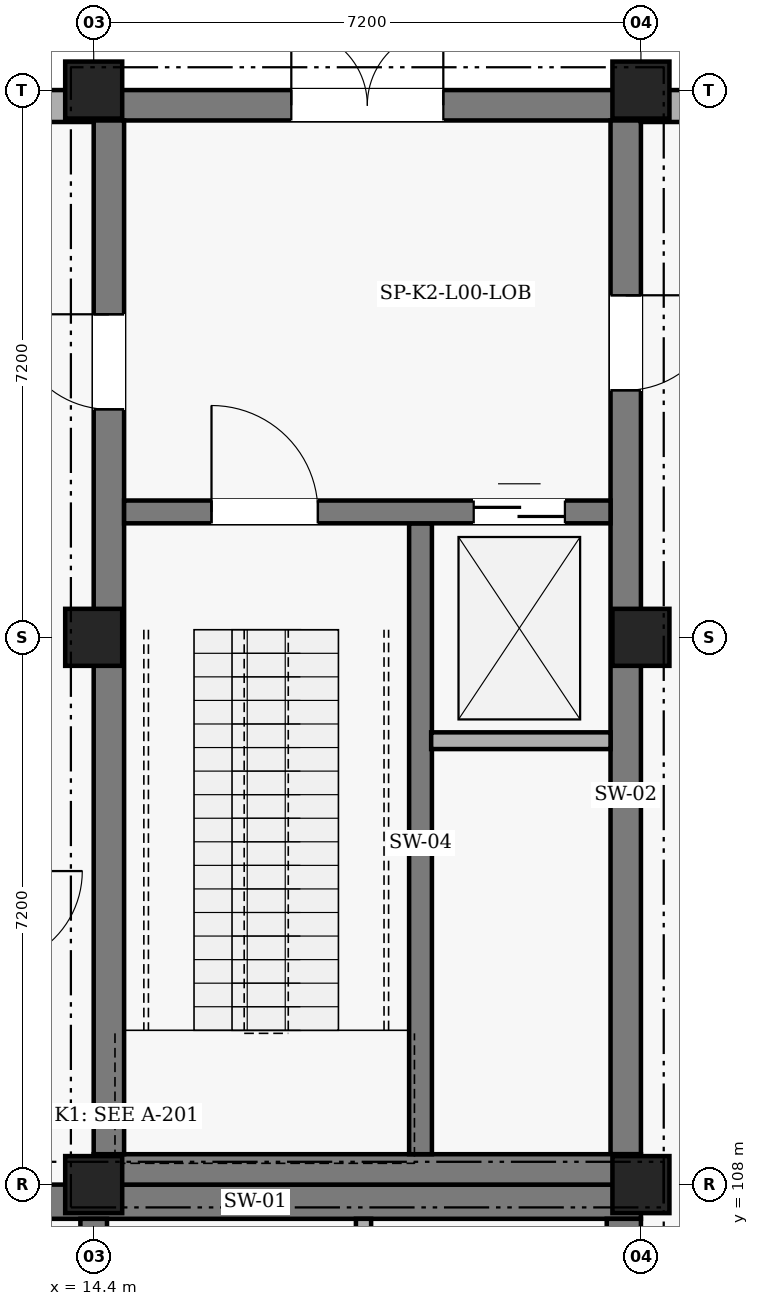
"""IFC4 building model, lengths in metres.
Left out: names, types, materials, properties, quantities, classifications, styles, units other than length and angle.
Written with IfcOpenShell. Run it as: python <this file> out.ifc"""

import sys

from ifc_helpers import new_model, si_unit, direction, frame, frame_2d, origin, origin_2d, place, context, subcontext, project, spatial, rectangle, extrude, element, fill, save


model = new_model("IFC4")
c1 = context("Model", 3, precision=1e-05, world=origin(), true_north=direction((0.0, 1.0)))
c2 = subcontext(c1, "Body", "Model", "MODEL_VIEW")
j1 = project(units=[si_unit("LENGTHUNIT", "METRE"), si_unit("PLANEANGLEUNIT", "RADIAN")], contexts=[c1])
p1 = place(None, origin())
s1 = spatial("IfcSite", under=j1, at=p1, CompositionType="ELEMENT")
p2 = place(p1, origin())
s2 = spatial("IfcBuilding", under=s1, at=p2, CompositionType="ELEMENT")
p3 = place(p2, origin())
s3 = spatial("IfcBuildingStorey", under=s2, at=p3, CompositionType="ELEMENT", Elevation=0.0)
p4 = place(p3, frame((7.2, 107.775, 0.0), z_axis=(0.0, 0.0, 1.0), x_axis=(1.0, 0.0, 0.0)))
e1 = element("IfcWall", 1, at=p4, inside=s3, PredefinedType="SHEAR", context=c2, shape_type="SweptSolid", body=[
    extrude(rectangle(XDim=14.4, YDim=0.45, at=frame_2d((7.2, 0.0))), origin(), (0.0, 0.0, 1.0), 5.4),
])
p5 = place(p4, frame((2.4, 0.0, 0.0)))
e2 = element("IfcOpeningElement", 2, at=p5, cuts=e1, PredefinedType="OPENING", context=c2, shape_type="SweptSolid", body=[
    extrude(rectangle(XDim=1.25, YDim=2.2, at=frame_2d((0.625, 1.1))), frame((0.0, 0.235, 0.0), z_axis=(0.0, -1.0, 0.0), x_axis=(1.0, 0.0, 0.0)), (0.0, 0.0, 1.0), 0.47),
])
p6 = place(p3, frame((21.375, 107.55, 0.0), z_axis=(0.0, 0.0, 1.0), x_axis=(0.0, -1.0, 0.0)))
e3 = element("IfcWall", 3, at=p6, inside=s3, PredefinedType="SHEAR", context=c2, shape_type="SweptSolid", body=[
    extrude(rectangle(XDim=13.5, YDim=0.45, at=frame_2d((6.75, 0.0))), origin(), (0.0, 0.0, 1.0), 5.4),
])
p7 = place(p6, frame((9.8, 0.0, 0.0)))
e4 = element("IfcOpeningElement", 4, at=p7, cuts=e3, PredefinedType="OPENING", context=c2, shape_type="SweptSolid", body=[
    extrude(rectangle(XDim=1.0, YDim=2.15, at=frame_2d((0.5, 1.075))), frame((0.0, 0.235, 0.0), z_axis=(0.0, -1.0, 0.0), x_axis=(1.0, 0.0, 0.0)), (0.0, 0.0, 1.0), 0.47),
])
p8 = place(p6, frame((2.3, 0.0, 0.0)))
e5 = element("IfcOpeningElement", 5, at=p8, cuts=e3, PredefinedType="OPENING", context=c2, shape_type="SweptSolid", body=[
    extrude(rectangle(XDim=1.25, YDim=2.2, at=frame_2d((0.625, 1.1))), frame((0.0, 0.235, 0.0), z_axis=(0.0, -1.0, 0.0), x_axis=(1.0, 0.0, 0.0)), (0.0, 0.0, 1.0), 0.47),
])
p9 = place(p3, frame((14.4, 107.55, 0.0), z_axis=(0.0, 0.0, 1.0), x_axis=(0.0, -1.0, 0.0)))
e6 = element("IfcWall", 6, at=p9, inside=s3, PredefinedType="SHEAR", context=c2, shape_type="SweptSolid", body=[
    extrude(rectangle(XDim=13.5, YDim=0.35, at=frame_2d((6.75, 0.0))), origin(), (0.0, 0.0, 1.0), 5.4),
])
p10 = place(p9, frame((1.4, 0.0, 0.0)))
e7 = element("IfcOpeningElement", 7, at=p10, cuts=e6, PredefinedType="OPENING", context=c2, shape_type="SweptSolid", body=[
    extrude(rectangle(XDim=1.25, YDim=2.2, at=frame_2d((0.625, 1.1))), frame((0.0, 0.185, 0.0), z_axis=(0.0, -1.0, 0.0), x_axis=(1.0, 0.0, 0.0)), (0.0, 0.0, 1.0), 0.37),
])
p11 = place(p3, frame((14.4, 122.2, 0.0), z_axis=(0.0, 0.0, 1.0), x_axis=(1.0, 0.0, 0.0)))
e8 = element("IfcWall", 8, at=p11, inside=s3, PredefinedType="SHEAR", context=c2, shape_type="SweptSolid", body=[
    extrude(rectangle(XDim=7.2, YDim=0.4, at=frame_2d((3.6, 0.0))), origin(), (0.0, 0.0, 1.0), 5.4),
])
p12 = place(p11, frame((2.6, 0.0, 0.0)))
e9 = element("IfcOpeningElement", 9, at=p12, cuts=e8, PredefinedType="OPENING", context=c2, shape_type="SweptSolid", body=[
    extrude(rectangle(XDim=2.0, YDim=2.3, at=frame_2d((1.0, 1.15))), frame((0.0, 0.21, 0.0), z_axis=(0.0, -1.0, 0.0), x_axis=(1.0, 0.0, 0.0)), (0.0, 0.0, 1.0), 0.42),
])
p13 = place(p3, frame((21.4, 122.0, 0.0), z_axis=(0.0, 0.0, 1.0), x_axis=(0.0, -1.0, 0.0)))
e10 = element("IfcWall", 10, at=p13, inside=s3, PredefinedType="SHEAR", context=c2, shape_type="SweptSolid", body=[
    extrude(rectangle(XDim=13.6, YDim=0.4, at=frame_2d((6.8, 0.0))), origin(), (0.0, 0.0, 1.0), 5.4),
])
p14 = place(p13, frame((2.3, 0.0, 0.0)))
e11 = element("IfcOpeningElement", 11, at=p14, cuts=e10, PredefinedType="OPENING", context=c2, shape_type="SweptSolid", body=[
    extrude(rectangle(XDim=1.25, YDim=2.2, at=frame_2d((0.625, 1.1))), frame((0.0, 0.21, 0.0), z_axis=(0.0, -1.0, 0.0), x_axis=(1.0, 0.0, 0.0)), (0.0, 0.0, 1.0), 0.42),
])
p15 = place(p3, frame((21.6, 108.2, 0.0), z_axis=(0.0, 0.0, 1.0), x_axis=(-1.0, 0.0, 0.0)))
e12 = element("IfcWall", 12, at=p15, inside=s3, PredefinedType="SHEAR", context=c2, shape_type="SweptSolid", body=[
    extrude(rectangle(XDim=7.2, YDim=0.4, at=frame_2d((3.6, 0.0))), origin(), (0.0, 0.0, 1.0), 5.4),
])
p16 = place(p3, frame((14.6, 108.4, 0.0), z_axis=(0.0, 0.0, 1.0), x_axis=(0.0, 1.0, 0.0)))
e13 = element("IfcWall", 13, at=p16, inside=s3, PredefinedType="SHEAR", context=c2, shape_type="SweptSolid", body=[
    extrude(rectangle(XDim=13.6, YDim=0.4, at=frame_2d((6.8, 0.0))), origin(), (0.0, 0.0, 1.0), 5.4),
])
p17 = place(p16, frame((9.8, 0.0, 0.0)))
e14 = element("IfcOpeningElement", 14, at=p17, cuts=e13, PredefinedType="OPENING", context=c2, shape_type="SweptSolid", body=[
    extrude(rectangle(XDim=1.25, YDim=2.2, at=frame_2d((0.625, 1.1))), frame((0.0, 0.21, 0.0), z_axis=(0.0, -1.0, 0.0), x_axis=(1.0, 0.0, 0.0)), (0.0, 0.0, 1.0), 0.42),
])
p18 = place(p3, frame((18.7, 116.7, 0.0), z_axis=(0.0, 0.0, 1.0), x_axis=(0.0, -1.0, 0.0)))
e15 = element("IfcWall", 15, at=p18, inside=s3, PredefinedType="SHEAR", context=c2, shape_type="SweptSolid", body=[
    extrude(rectangle(XDim=8.3, YDim=0.3, at=frame_2d((4.15, 0.0))), origin(), (0.0, 0.0, 1.0), 5.4),
])
p19 = place(p3, frame((14.8, 116.85, 0.0), z_axis=(0.0, 0.0, 1.0), x_axis=(1.0, 0.0, 0.0)))
e16 = element("IfcWall", 16, at=p19, inside=s3, PredefinedType="SHEAR", context=c2, shape_type="SweptSolid", body=[
    extrude(rectangle(XDim=6.4, YDim=0.3, at=frame_2d((3.2, 0.0))), origin(), (0.0, 0.0, 1.0), 5.4),
])
p20 = place(p19, frame((1.15, 0.0, 0.0)))
e17 = element("IfcOpeningElement", 17, at=p20, cuts=e16, PredefinedType="OPENING", context=c2, shape_type="SweptSolid", body=[
    extrude(rectangle(XDim=1.4, YDim=2.2, at=frame_2d((0.7, 1.1))), frame((0.0, 0.16, 0.0), z_axis=(0.0, -1.0, 0.0), x_axis=(1.0, 0.0, 0.0)), (0.0, 0.0, 1.0), 0.32),
])
p21 = place(p19, frame((4.6, 0.0, 0.0)))
e18 = element("IfcOpeningElement", 18, at=p21, cuts=e16, PredefinedType="OPENING", context=c2, shape_type="SweptSolid", body=[
    extrude(rectangle(XDim=1.2, YDim=2.15, at=frame_2d((0.6, 1.075))), frame((0.0, 0.16, 0.0), z_axis=(0.0, -1.0, 0.0), x_axis=(1.0, 0.0, 0.0)), (0.0, 0.0, 1.0), 0.32),
])
for number, where, z_axis, x_axis in (
    (19, (14.4, 108.0, 0.0), (0.0, 0.0, 1.0), (1.0, 0.0, 0.0)),
    (20, (14.4, 115.2, 0.0), (0.0, 0.0, 1.0), (1.0, 0.0, 0.0)),
    (21, (14.4, 122.4, 0.0), (0.0, 0.0, 1.0), (1.0, 0.0, 0.0)),
    (22, (21.6, 108.0, 0.0), (0.0, 0.0, 1.0), (1.0, 0.0, 0.0)),
    (23, (21.6, 115.2, 0.0), (0.0, 0.0, 1.0), (1.0, 0.0, 0.0)),
    (24, (21.6, 122.4, 0.0), (0.0, 0.0, 1.0), (1.0, 0.0, 0.0)),
):
    element("IfcColumn", number, at=place(p3, frame(where, z_axis=z_axis, x_axis=x_axis)), inside=s3, PredefinedType="COLUMN", context=c2, shape_type="SweptSolid", body=[
        extrude(rectangle(XDim=0.75, YDim=0.75, at=origin_2d()), origin(), (0.0, 0.0, 1.0), 5.08),
    ])
p22 = place(p3, frame((7.2, 122.19, 0.0), z_axis=(0.0, 0.0, 1.0), x_axis=(1.0, 0.0, 0.0)))
e25 = element("IfcWall", 25, at=p22, inside=s3, PredefinedType="SOLIDWALL", context=c2, shape_type="SweptSolid", body=[
    extrude(rectangle(XDim=7.2, YDim=0.42, at=frame_2d((3.6, 0.0))), origin(), (0.0, 0.0, 1.0), 4.78),
])
p23 = place(p22, frame((2.5, 0.0, 0.0)))
e26 = element("IfcOpeningElement", 26, at=p23, cuts=e25, PredefinedType="OPENING", context=c2, shape_type="SweptSolid", body=[
    extrude(rectangle(XDim=2.2, YDim=2.4, at=frame_2d((1.1, 1.2))), frame((0.0, 0.22, 0.0), z_axis=(0.0, -1.0, 0.0), x_axis=(1.0, 0.0, 0.0)), (0.0, 0.0, 1.0), 0.44),
])
p24 = place(p3, frame((21.6, 122.19, 0.0), z_axis=(0.0, 0.0, 1.0), x_axis=(1.0, 0.0, 0.0)))
e27 = element("IfcWall", 27, at=p24, inside=s3, PredefinedType="SOLIDWALL", context=c2, shape_type="SweptSolid", body=[
    extrude(rectangle(XDim=7.2, YDim=0.42, at=frame_2d((3.6, 0.0))), origin(), (0.0, 0.0, 1.0), 4.78),
])
p25 = place(p24, frame((2.4, 0.0, 0.0)))
e28 = element("IfcOpeningElement", 28, at=p25, cuts=e27, PredefinedType="OPENING", context=c2, shape_type="SweptSolid", body=[
    extrude(rectangle(XDim=2.4, YDim=2.5, at=frame_2d((1.2, 1.25))), frame((0.0, 0.22, 0.0), z_axis=(0.0, -1.0, 0.0), x_axis=(1.0, 0.0, 0.0)), (0.0, 0.0, 1.0), 0.44),
])
p26 = place(p3, frame((17.95, 102.56, 0.0), z_axis=(0.0, 0.0, 1.0), x_axis=(0.0, 1.0, 0.0)))
e29 = element("IfcWall", 29, at=p26, inside=s3, PredefinedType="PARTITIONING", context=c2, shape_type="SweptSolid", body=[
    extrude(rectangle(XDim=4.99, YDim=0.2, at=frame_2d((2.495, 0.0))), origin(), (0.0, 0.0, 1.0), 5.05),
])
p27 = place(p26, frame((1.6, 0.0, 0.0)))
e30 = element("IfcOpeningElement", 30, at=p27, cuts=e29, PredefinedType="OPENING", context=c2, shape_type="SweptSolid", body=[
    extrude(rectangle(XDim=1.25, YDim=2.2, at=frame_2d((0.625, 1.1))), frame((0.0, 0.11, 0.0), z_axis=(0.0, -1.0, 0.0), x_axis=(1.0, 0.0, 0.0)), (0.0, 0.0, 1.0), 0.22),
])
p28 = place(p3, frame((18.84, 113.84, 0.0), z_axis=(0.0, 0.0, 1.0), x_axis=(1.0, 0.0, 0.0)))
e31 = element("IfcWall", 31, at=p28, inside=s3, PredefinedType="PARTITIONING", context=c2, shape_type="SweptSolid", body=[
    extrude(rectangle(XDim=2.36, YDim=0.22, at=frame_2d((1.18, 0.0))), origin(), (0.0, 0.0, 1.0), 5.05),
])
p29 = place(p12, origin())
e32 = element("IfcDoor", 32, at=p29, inside=s3, OperationType="DOUBLE_DOOR_SINGLE_SWING", PredefinedType="DOOR", context=c2, shape_type="SweptSolid", body=[
    extrude(rectangle(XDim=2.0, YDim=2.3, at=frame_2d((1.0, 1.15))), frame((0.0, 0.025, 0.0), z_axis=(0.0, -1.0, 0.0), x_axis=(1.0, 0.0, 0.0)), (0.0, 0.0, 1.0), 0.05),
])
fill(e9, e32)
p30 = place(p20, origin())
e33 = element("IfcDoor", 33, at=p30, inside=s3, OperationType="SINGLE_SWING_LEFT", PredefinedType="DOOR", context=c2, shape_type="SweptSolid", body=[
    extrude(rectangle(XDim=1.4, YDim=2.2, at=frame_2d((0.7, 1.1))), frame((0.0, 0.025, 0.0), z_axis=(0.0, -1.0, 0.0), x_axis=(1.0, 0.0, 0.0)), (0.0, 0.0, 1.0), 0.05),
])
fill(e17, e33)
p31 = place(p21, origin())
e34 = element("IfcDoor", 34, at=p31, inside=s3, OperationType="DOUBLE_DOOR_SLIDING", PredefinedType="DOOR", context=c2, shape_type="SweptSolid", body=[
    extrude(rectangle(XDim=1.2, YDim=2.15, at=frame_2d((0.6, 1.075))), frame((0.0, 0.025, 0.0), z_axis=(0.0, -1.0, 0.0), x_axis=(1.0, 0.0, 0.0)), (0.0, 0.0, 1.0), 0.05),
])
fill(e18, e34)
p32 = place(p17, origin())
e35 = element("IfcDoor", 35, at=p32, inside=s3, OperationType="SINGLE_SWING_RIGHT", PredefinedType="DOOR", context=c2, shape_type="SweptSolid", body=[
    extrude(rectangle(XDim=1.25, YDim=2.2, at=frame_2d((0.625, 1.1))), frame((0.0, 0.025, 0.0), z_axis=(0.0, -1.0, 0.0), x_axis=(1.0, 0.0, 0.0)), (0.0, 0.0, 1.0), 0.05),
])
fill(e14, e35)
p33 = place(p14, origin())
e36 = element("IfcDoor", 36, at=p33, inside=s3, OperationType="SINGLE_SWING_LEFT", PredefinedType="DOOR", context=c2, shape_type="SweptSolid", body=[
    extrude(rectangle(XDim=1.25, YDim=2.2, at=frame_2d((0.625, 1.1))), frame((0.0, 0.025, 0.0), z_axis=(0.0, -1.0, 0.0), x_axis=(1.0, 0.0, 0.0)), (0.0, 0.0, 1.0), 0.05),
])
fill(e11, e36)
save(model, sys.argv[1])
